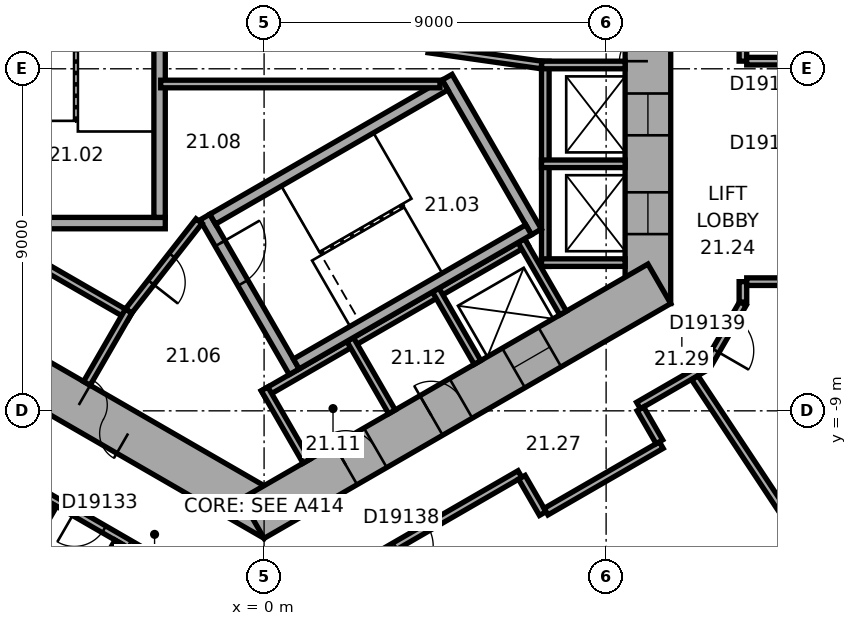
"""IFC4 building model, lengths in metres.
Left out: names, types, materials, properties, quantities, classifications, styles, units other than length and angle.
Written with IfcOpenShell. Run it as: python <this file> out.ifc"""

import sys

from ifc_helpers import new_model, si_unit, direction, frame, frame_2d, origin, place, context, subcontext, project, spatial, rectangle, extrude, element, fill, save


model = new_model("IFC4")
c1 = context("Model", 3, precision=1e-05, world=origin(), true_north=direction((0.0, 1.0)))
c2 = subcontext(c1, "Body", "Model", "MODEL_VIEW")
j1 = project(units=[si_unit("LENGTHUNIT", "METRE"), si_unit("PLANEANGLEUNIT", "RADIAN")], contexts=[c1])
p1 = place(None, origin())
s1 = spatial("IfcSite", under=j1, at=p1, CompositionType="ELEMENT")
p2 = place(p1, origin())
s2 = spatial("IfcBuilding", under=s1, at=p2, CompositionType="ELEMENT")
p3 = place(p2, frame((0.0, 0.0, 93.5)))
s3 = spatial("IfcBuildingStorey", under=s2, at=p3, CompositionType="ELEMENT", Elevation=93.5)
p4 = place(p3, frame((10.1, -6.177, 0.0), z_axis=(0.0, 0.0, 1.0), x_axis=(0.0, 1.0, 0.0)))
e1 = element("IfcWall", 1, at=p4, inside=s3, PredefinedType="SHEAR", context=c2, shape_type="SweptSolid", body=[
    extrude(rectangle(XDim=12.355, YDim=1.2, at=frame_2d((6.177, 0.0))), origin(), (0.0, 0.0, 1.0), 3.3),
])
p5 = place(p4, frame((6.378, 0.0, 0.0)))
e2 = element("IfcOpeningElement", 2, at=p5, cuts=e1, PredefinedType="OPENING", context=c2, shape_type="SweptSolid", body=[
    extrude(rectangle(XDim=1.5, YDim=2.1, at=frame_2d((0.75, 1.05))), frame((0.0, 0.61, 0.0), z_axis=(0.0, -1.0, 0.0), x_axis=(1.0, 0.0, 0.0)), (0.0, 0.0, 1.0), 1.22),
])
p6 = place(p4, frame((1.828, 0.0, 0.0)))
e3 = element("IfcOpeningElement", 3, at=p6, cuts=e1, PredefinedType="OPENING", context=c2, shape_type="SweptSolid", body=[
    extrude(rectangle(XDim=1.1, YDim=2.1, at=frame_2d((0.55, 1.05))), frame((0.0, 0.61, 0.0), z_axis=(0.0, -1.0, 0.0), x_axis=(1.0, 0.0, 0.0)), (0.0, 0.0, 1.0), 1.22),
])
p7 = place(p4, frame((4.427, 0.0, 0.0)))
e4 = element("IfcOpeningElement", 4, at=p7, cuts=e1, PredefinedType="OPENING", context=c2, shape_type="SweptSolid", body=[
    extrude(rectangle(XDim=1.1, YDim=2.1, at=frame_2d((0.55, 1.05))), frame((0.0, 0.61, 0.0), z_axis=(0.0, -1.0, 0.0), x_axis=(1.0, 0.0, 0.0)), (0.0, 0.0, 1.0), 1.22),
])
p8 = place(p3, frame((-10.4, -5.658, 0.0), z_axis=(0.0, 0.0, 1.0), x_axis=(0.866021384402, -0.500006961711, 0.0)))
e5 = element("IfcWall", 5, at=p8, inside=s3, PredefinedType="SHEAR", context=c2, shape_type="SweptSolid", body=[
    extrude(rectangle(XDim=12.355, YDim=1.2, at=frame_2d((6.178, 0.0))), origin(), (0.0, 0.0, 1.0), 3.3),
])
p9 = place(p8, frame((6.378, 0.0, 0.0)))
e6 = element("IfcOpeningElement", 6, at=p9, cuts=e5, PredefinedType="OPENING", context=c2, shape_type="SweptSolid", body=[
    extrude(rectangle(XDim=1.5, YDim=2.1, at=frame_2d((0.75, 1.05))), frame((0.0, 0.61, 0.0), z_axis=(0.0, -1.0, 0.0), x_axis=(1.0, 0.0, 0.0)), (0.0, 0.0, 1.0), 1.22),
])
p10 = place(p8, frame((3.228, 0.0, 0.0)))
e7 = element("IfcOpeningElement", 7, at=p10, cuts=e5, PredefinedType="OPENING", context=c2, shape_type="SweptSolid", body=[
    extrude(rectangle(XDim=0.9, YDim=2.1, at=frame_2d((0.45, 1.05))), frame((0.0, 0.61, 0.0), z_axis=(0.0, -1.0, 0.0), x_axis=(1.0, 0.0, 0.0)), (0.0, 0.0, 1.0), 1.22),
])
p11 = place(p3, frame((-0.3, -11.836, 0.0), z_axis=(0.0, 0.0, 1.0), x_axis=(0.866021384402, 0.500006961711, 0.0)))
e8 = element("IfcWall", 8, at=p11, inside=s3, PredefinedType="SHEAR", context=c2, shape_type="SweptSolid", body=[
    extrude(rectangle(XDim=12.355, YDim=1.2, at=frame_2d((6.178, 0.0))), origin(), (0.0, 0.0, 1.0), 3.3),
])
p12 = place(p11, frame((2.828, 0.0, 0.0)))
e9 = element("IfcOpeningElement", 9, at=p12, cuts=e8, PredefinedType="OPENING", context=c2, shape_type="SweptSolid", body=[
    extrude(rectangle(XDim=0.9, YDim=2.1, at=frame_2d((0.45, 1.05))), frame((0.0, 0.61, 0.0), z_axis=(0.0, -1.0, 0.0), x_axis=(1.0, 0.0, 0.0)), (0.0, 0.0, 1.0), 1.22),
])
p13 = place(p11, frame((5.428, 0.0, 0.0)))
e10 = element("IfcOpeningElement", 10, at=p13, cuts=e8, PredefinedType="OPENING", context=c2, shape_type="SweptSolid", body=[
    extrude(rectangle(XDim=0.9, YDim=2.1, at=frame_2d((0.45, 1.05))), frame((0.0, 0.61, 0.0), z_axis=(0.0, -1.0, 0.0), x_axis=(1.0, 0.0, 0.0)), (0.0, 0.0, 1.0), 1.22),
])
p14 = place(p11, frame((7.928, 0.0, 0.0)))
e11 = element("IfcOpeningElement", 11, at=p14, cuts=e8, PredefinedType="OPENING", context=c2, shape_type="SweptSolid", body=[
    extrude(rectangle(XDim=1.1, YDim=2.1, at=frame_2d((0.55, 1.05))), frame((0.0, 0.61, 0.0), z_axis=(0.0, -1.0, 0.0), x_axis=(1.0, 0.0, 0.0)), (0.0, 0.0, 1.0), 1.22),
])
p15 = place(p3, frame((7.4, -5.2, 0.0), z_axis=(0.0, 0.0, 1.0), x_axis=(0.0, 1.0, 0.0)))
e12 = element("IfcWall", 12, at=p15, inside=s3, PredefinedType="PARTITIONING", context=c2, shape_type="SweptSolid", body=[
    extrude(rectangle(XDim=5.4, YDim=0.2, at=frame_2d((2.7, 0.0))), origin(), (0.0, 0.0, 1.0), 3.05),
])
for number, where, z_axis, x_axis in (
    (13, (7.3, -5.1, 0.0), (0.0, 0.0, 1.0), (1.0, 0.0, 0.0)),
    (14, (7.3, -2.5, 0.0), (0.0, 0.0, 1.0), (1.0, 0.0, 0.0)),
    (15, (7.3, 0.1, 0.0), (0.0, 0.0, 1.0), (1.0, 0.0, 0.0)),
):
    element("IfcWall", number, at=place(p3, frame(where, z_axis=z_axis, x_axis=x_axis)), inside=s3, PredefinedType="PARTITIONING", context=c2, shape_type="SweptSolid", body=[
        extrude(rectangle(XDim=2.2, YDim=0.2, at=frame_2d((1.1, 0.0))), origin(), (0.0, 0.0, 1.0), 3.05),
    ])
p16 = place(p3, frame((-8.203, -3.809, 0.0), z_axis=(0.0, 0.0, 1.0), x_axis=(0.866028230842, -0.499995103361, 0.0)))
e16 = element("IfcWall", 16, at=p16, inside=s3, PredefinedType="PARTITIONING", context=c2, shape_type="SweptSolid", body=[
    extrude(rectangle(XDim=5.4, YDim=0.2, at=frame_2d((2.7, 0.0))), origin(), (0.0, 0.0, 1.0), 3.05),
])
p17 = place(p3, frame((-3.563, -6.372, 0.0), z_axis=(0.0, 0.0, 1.0), x_axis=(-0.499994660107, -0.866028486751, 0.0)))
e17 = element("IfcWall", 17, at=p17, inside=s3, PredefinedType="PARTITIONING", context=c2, shape_type="SweptSolid", body=[
    extrude(rectangle(XDim=2.2, YDim=0.2, at=frame_2d((1.1, 0.0))), origin(), (0.0, 0.0, 1.0), 3.05),
])
p18 = place(p3, frame((-0.024, -8.559, 0.0), z_axis=(0.0, 0.0, 1.0), x_axis=(0.866026010844, 0.49999894854, 0.0)))
e18 = element("IfcWall", 18, at=p18, inside=s3, PredefinedType="PARTITIONING", context=c2, shape_type="SweptSolid", body=[
    extrude(rectangle(XDim=8.0, YDim=0.2, at=frame_2d((4.0, 0.0))), origin(), (0.0, 0.0, 1.0), 3.05),
])
for number, where, z_axis, x_axis in (
    (19, (0.013, -8.422, 0.0), (0.0, 0.0, 1.0), (0.5, -0.866, 0.0)),
    (20, (2.264, -7.122, 0.0), (0.0, 0.0, 1.0), (0.5, -0.866, 0.0)),
    (21, (4.516, -5.822, 0.0), (0.0, 0.0, 1.0), (0.5, -0.866, 0.0)),
    (22, (6.768, -4.522, 0.0), (0.0, 0.0, 1.0), (0.5, -0.866, 0.0)),
):
    element("IfcWall", number, at=place(p3, frame(where, z_axis=z_axis, x_axis=x_axis)), inside=s3, PredefinedType="PARTITIONING", context=c2, shape_type="SweptSolid", body=[
        extrude(rectangle(XDim=2.2, YDim=0.2, at=frame_2d((1.1, 0.0))), origin(), (0.0, 0.0, 1.0), 3.05),
    ])
p19 = place(p3, frame((-2.6, -4.06, 0.0), z_axis=(0.0, 0.0, 1.0), x_axis=(-1.0, 0.0, 0.0)))
e23 = element("IfcWall", 23, at=p19, inside=s3, PredefinedType="SHEAR", context=c2, shape_type="SweptSolid", body=[
    extrude(rectangle(XDim=4.7, YDim=0.3, at=frame_2d((2.35, 0.0))), origin(), (0.0, 0.0, 1.0), 3.05),
])
p20 = place(p3, frame((-2.75, 3.15, 0.0), z_axis=(0.0, 0.0, 1.0), x_axis=(0.0, -1.0, 0.0)))
e24 = element("IfcWall", 24, at=p20, inside=s3, PredefinedType="SHEAR", context=c2, shape_type="SweptSolid", body=[
    extrude(rectangle(XDim=7.06, YDim=0.3, at=frame_2d((3.53, 0.0))), origin(), (0.0, 0.0, 1.0), 3.05),
])
p21 = place(p3, frame((-1.558, -3.902, 0.0), z_axis=(0.0, 0.0, 1.0), x_axis=(0.499977259774, -0.866038532462, 0.0)))
e25 = element("IfcWall", 25, at=p21, inside=s3, PredefinedType="SHEAR", context=c2, shape_type="SweptSolid", body=[
    extrude(rectangle(XDim=4.7, YDim=0.3, at=frame_2d((2.35, 0.0))), origin(), (0.0, 0.0, 1.0), 3.05),
])
p22 = place(p21, frame((0.8, 0.0, 0.0)))
e26 = element("IfcOpeningElement", 26, at=p22, cuts=e25, PredefinedType="OPENING", context=c2, shape_type="SweptSolid", body=[
    extrude(rectangle(XDim=1.2, YDim=2.1, at=frame_2d((0.6, 1.05))), frame((0.0, 0.16, 0.0), z_axis=(0.0, -1.0, 0.0), x_axis=(1.0, 0.0, 0.0)), (0.0, 0.0, 1.0), 0.32),
])
p23 = place(p3, frame((4.816, -0.222, 0.0), z_axis=(0.0, 0.0, 1.0), x_axis=(0.499977259774, -0.866038532462, 0.0)))
e27 = element("IfcWall", 27, at=p23, inside=s3, PredefinedType="SHEAR", context=c2, shape_type="SweptSolid", body=[
    extrude(rectangle(XDim=4.7, YDim=0.3, at=frame_2d((2.35, 0.0))), origin(), (0.0, 0.0, 1.0), 3.05),
])
for number, where, z_axis, x_axis in (
    (28, (-1.353, -3.957, 0.0), (0.0, 0.0, 1.0), (0.866, 0.5, 0.0)),
    (29, (0.847, -7.767, 0.0), (0.0, 0.0, 1.0), (0.866, 0.5, 0.0)),
):
    element("IfcWall", number, at=place(p3, frame(where, z_axis=z_axis, x_axis=x_axis)), inside=s3, PredefinedType="SHEAR", context=c2, shape_type="SweptSolid", body=[
        extrude(rectangle(XDim=7.06, YDim=0.3, at=frame_2d((3.53, 0.0))), origin(), (0.0, 0.0, 1.0), 3.05),
    ])
p24 = place(p3, frame((4.327, 0.521, 0.0), z_axis=(0.0, 0.0, 1.0), x_axis=(0.990124376366, -0.14019172346, 0.0)))
e30 = element("IfcWall", 30, at=p24, inside=s3, PredefinedType="PARTITIONING", context=c2, shape_type="SweptSolid", body=[
    extrude(rectangle(XDim=3.002, YDim=0.2, at=frame_2d((1.501, 0.0))), origin(), (0.0, 0.0, 1.0), 3.05),
])
p25 = place(p3, frame((-1.712, -4.008, 0.0), z_axis=(0.0, 0.0, 1.0), x_axis=(-0.616549420702, -0.787316208287, 0.0)))
e31 = element("IfcWall", 31, at=p25, inside=s3, PredefinedType="PARTITIONING", context=c2, shape_type="SweptSolid", body=[
    extrude(rectangle(XDim=3.002, YDim=0.2, at=frame_2d((1.501, 0.0))), origin(), (0.0, 0.0, 1.0), 3.05),
])
p26 = place(p25, frame((1.15, 0.0, 0.0)))
e32 = element("IfcOpeningElement", 32, at=p26, cuts=e31, PredefinedType="OPENING", context=c2, shape_type="SweptSolid", body=[
    extrude(rectangle(XDim=0.9, YDim=2.1, at=frame_2d((0.45, 1.05))), frame((0.0, 0.11, 0.0), z_axis=(0.0, -1.0, 0.0), x_axis=(1.0, 0.0, 0.0)), (0.0, 0.0, 1.0), 0.22),
])
p27 = place(p3, frame((-2.72, -0.4, 0.0), z_axis=(0.0, 0.0, 1.0), x_axis=(1.0, 0.0, 0.0)))
e33 = element("IfcWall", 33, at=p27, inside=s3, PredefinedType="PARTITIONING", context=c2, shape_type="SweptSolid", body=[
    extrude(rectangle(XDim=7.347, YDim=0.2, at=frame_2d((3.674, 0.0))), origin(), (0.0, 0.0, 1.0), 3.05),
])
p28 = place(p3, frame((-11.615, -7.843, 0.0), z_axis=(0.0, 0.0, 1.0), x_axis=(0.866026466995, -0.499998158461, 0.0)))
e34 = element("IfcWall", 34, at=p28, inside=s3, PredefinedType="PARTITIONING", context=c2, shape_type="SweptSolid", body=[
    extrude(rectangle(XDim=12.315, YDim=0.2, at=frame_2d((6.158, 0.0))), origin(), (0.0, 0.0, 1.0), 3.05),
])
p29 = place(p28, frame((1.665, 0.0, 0.0)))
e35 = element("IfcOpeningElement", 35, at=p29, cuts=e34, PredefinedType="OPENING", context=c2, shape_type="SweptSolid", body=[
    extrude(rectangle(XDim=0.9, YDim=2.1, at=frame_2d((0.45, 1.05))), frame((0.0, 0.11, 0.0), z_axis=(0.0, -1.0, 0.0), x_axis=(1.0, 0.0, 0.0)), (0.0, 0.0, 1.0), 0.22),
])
p30 = place(p28, frame((7.65, 0.0, 0.0)))
e36 = element("IfcOpeningElement", 36, at=p30, cuts=e34, PredefinedType="OPENING", context=c2, shape_type="SweptSolid", body=[
    extrude(rectangle(XDim=0.9, YDim=2.1, at=frame_2d((0.45, 1.05))), frame((0.0, 0.11, 0.0), z_axis=(0.0, -1.0, 0.0), x_axis=(1.0, 0.0, 0.0)), (0.0, 0.0, 1.0), 0.22),
])
p31 = place(p28, frame((9.317, 0.0, 0.0)))
e37 = element("IfcOpeningElement", 37, at=p31, cuts=e34, PredefinedType="OPENING", context=c2, shape_type="SweptSolid", body=[
    extrude(rectangle(XDim=0.9, YDim=2.1, at=frame_2d((0.45, 1.05))), frame((0.0, 0.11, 0.0), z_axis=(0.0, -1.0, 0.0), x_axis=(1.0, 0.0, 0.0)), (0.0, 0.0, 1.0), 0.22),
])
p32 = place(p3, frame((-8.46, -20.461, 0.0), z_axis=(0.0, 0.0, 1.0), x_axis=(0.499999662836, 0.866025598446, 0.0)))
e38 = element("IfcWall", 38, at=p32, inside=s3, PredefinedType="PARTITIONING", context=c2, shape_type="SweptSolid", body=[
    extrude(rectangle(XDim=9.25, YDim=0.2, at=frame_2d((4.625, 0.0))), origin(), (0.0, 0.0, 1.0), 3.05),
])
p33 = place(p3, frame((-5.51, -11.483, 0.0), z_axis=(0.0, 0.0, 1.0), x_axis=(-0.500004234368, -0.866022959057, 0.0)))
e39 = element("IfcWall", 39, at=p33, inside=s3, PredefinedType="PARTITIONING", context=c2, shape_type="SweptSolid", body=[
    extrude(rectangle(XDim=2.5, YDim=0.12, at=frame_2d((1.25, 0.0))), origin(), (0.0, 0.0, 1.0), 3.05),
])
p34 = place(p33, frame((0.8, 0.0, 0.0)))
e40 = element("IfcOpeningElement", 40, at=p34, cuts=e39, PredefinedType="OPENING", context=c2, shape_type="SweptSolid", body=[
    extrude(rectangle(XDim=0.9, YDim=2.1, at=frame_2d((0.45, 1.05))), frame((0.0, 0.07, 0.0), z_axis=(0.0, -1.0, 0.0), x_axis=(1.0, 0.0, 0.0)), (0.0, 0.0, 1.0), 0.14),
])
p35 = place(p3, frame((1.033, -13.953, 0.0), z_axis=(0.0, 0.0, 1.0), x_axis=(0.866017531406, 0.500013635111, 0.0)))
e41 = element("IfcWall", 41, at=p35, inside=s3, PredefinedType="PARTITIONING", context=c2, shape_type="SweptSolid", body=[
    extrude(rectangle(XDim=6.58, YDim=0.2, at=frame_2d((3.29, 0.0))), origin(), (0.0, 0.0, 1.0), 3.05),
])
p36 = place(p35, frame((2.79, 0.0, 0.0)))
e42 = element("IfcOpeningElement", 42, at=p36, cuts=e41, PredefinedType="OPENING", context=c2, shape_type="SweptSolid", body=[
    extrude(rectangle(XDim=1.0, YDim=2.1, at=frame_2d((0.5, 1.05))), frame((0.0, 0.11, 0.0), z_axis=(0.0, -1.0, 0.0), x_axis=(1.0, 0.0, 0.0)), (0.0, 0.0, 1.0), 0.22),
])
p37 = place(p3, frame((6.782, -10.749, 0.0), z_axis=(0.0, 0.0, 1.0), x_axis=(0.500074377092, -0.865982457891, 0.0)))
e43 = element("IfcWall", 43, at=p37, inside=s3, PredefinedType="PARTITIONING", context=c2, shape_type="SweptSolid", body=[
    extrude(rectangle(XDim=1.101, YDim=0.2, at=frame_2d((0.55, 0.0))), origin(), (0.0, 0.0, 1.0), 3.05),
])
p38 = place(p3, frame((7.419, -11.653, 0.0), z_axis=(0.0, 0.0, 1.0), x_axis=(0.866038154057, 0.49997791523, 0.0)))
e44 = element("IfcWall", 44, at=p38, inside=s3, PredefinedType="PARTITIONING", context=c2, shape_type="SweptSolid", body=[
    extrude(rectangle(XDim=3.502, YDim=0.2, at=frame_2d((1.751, 0.0))), origin(), (0.0, 0.0, 1.0), 3.05),
])
p39 = place(p3, frame((9.852, -8.861, 0.0), z_axis=(0.0, 0.0, 1.0), x_axis=(0.866013291437, 0.500020978615, 0.0)))
e45 = element("IfcWall", 45, at=p39, inside=s3, PredefinedType="PARTITIONING", context=c2, shape_type="SweptSolid", body=[
    extrude(rectangle(XDim=2.077, YDim=0.2, at=frame_2d((1.038, 0.0))), origin(), (0.0, 0.0, 1.0), 3.05),
])
p40 = place(p3, frame((10.402, -9.815, 0.0), z_axis=(0.0, 0.0, 1.0), x_axis=(-0.499968756647, 0.866043441391, 0.0)))
e46 = element("IfcWall", 46, at=p40, inside=s3, PredefinedType="PARTITIONING", context=c2, shape_type="SweptSolid", body=[
    extrude(rectangle(XDim=1.001, YDim=0.2, at=frame_2d((0.5, 0.0))), origin(), (0.0, 0.0, 1.0), 3.05),
])
p41 = place(p3, frame((11.67, -7.788, 0.0), z_axis=(0.0, 0.0, 1.0), x_axis=(0.500063286585, 0.865988862174, 0.0)))
e47 = element("IfcWall", 47, at=p41, inside=s3, PredefinedType="PARTITIONING", context=c2, shape_type="SweptSolid", body=[
    extrude(rectangle(XDim=1.86, YDim=0.2, at=frame_2d((0.93, 0.0))), origin(), (0.0, 0.0, 1.0), 3.05),
])
p42 = place(p41, frame((0.43, 0.0, 0.0)))
e48 = element("IfcOpeningElement", 48, at=p42, cuts=e47, PredefinedType="OPENING", context=c2, shape_type="SweptSolid", body=[
    extrude(rectangle(XDim=1.0, YDim=2.1, at=frame_2d((0.5, 1.05))), frame((0.0, 0.11, 0.0), z_axis=(0.0, -1.0, 0.0), x_axis=(1.0, 0.0, 0.0)), (0.0, 0.0, 1.0), 0.22),
])
p43 = place(p3, frame((12.6, -6.138, 0.0), z_axis=(0.0, 0.0, 1.0), x_axis=(0.0, 1.0, 0.0)))
e49 = element("IfcWall", 49, at=p43, inside=s3, PredefinedType="PARTITIONING", context=c2, shape_type="SweptSolid", body=[
    extrude(rectangle(XDim=0.537, YDim=0.2, at=frame_2d((0.268, 0.0))), origin(), (0.0, 0.0, 1.0), 3.05),
])
p44 = place(p3, frame((12.6, 0.201, 0.0), z_axis=(0.0, 0.0, 1.0), x_axis=(0.0, 1.0, 0.0)))
e50 = element("IfcWall", 50, at=p44, inside=s3, PredefinedType="PARTITIONING", context=c2, shape_type="SweptSolid", body=[
    extrude(rectangle(XDim=2.604, YDim=0.2, at=frame_2d((1.302, 0.0))), origin(), (0.0, 0.0, 1.0), 3.05),
])
p45 = place(p3, frame((12.7, -5.601, 0.0), z_axis=(0.0, 0.0, 1.0), x_axis=(1.0, 0.0, 0.0)))
e51 = element("IfcWall", 51, at=p45, inside=s3, PredefinedType="PARTITIONING", context=c2, shape_type="SweptSolid", body=[
    extrude(rectangle(XDim=1.101, YDim=0.2, at=frame_2d((0.551, 0.0))), origin(), (0.0, 0.0, 1.0), 3.05),
])
p46 = place(p3, frame((13.701, 0.201, 0.0), z_axis=(0.0, 0.0, 1.0), x_axis=(-1.0, 0.0, 0.0)))
e52 = element("IfcWall", 52, at=p46, inside=s3, PredefinedType="PARTITIONING", context=c2, shape_type="SweptSolid", body=[
    extrude(rectangle(XDim=1.001, YDim=0.2, at=frame_2d((0.5, 0.0))), origin(), (0.0, 0.0, 1.0), 3.05),
])
p47 = place(p3, frame((16.255, -15.564, 0.0), z_axis=(0.0, 0.0, 1.0), x_axis=(-0.55192208744, 0.833895682562, 0.0)))
e53 = element("IfcWall", 53, at=p47, inside=s3, PredefinedType="PARTITIONING", context=c2, shape_type="SweptSolid", body=[
    extrude(rectangle(XDim=8.913, YDim=0.2, at=frame_2d((4.457, 0.0))), origin(), (0.0, 0.0, 1.0), 2.6),
])
p48 = place(p5, origin())
e54 = element("IfcDoor", 54, at=p48, inside=s3, OperationType="DOUBLE_DOOR_SINGLE_SWING", PredefinedType="DOOR", context=c2, shape_type="SweptSolid", body=[
    extrude(rectangle(XDim=1.5, YDim=2.1, at=frame_2d((0.75, 1.05))), frame((0.0, 0.025, 0.0), z_axis=(0.0, -1.0, 0.0), x_axis=(1.0, 0.0, 0.0)), (0.0, 0.0, 1.0), 0.05),
])
fill(e2, e54)
p49 = place(p9, origin())
e55 = element("IfcDoor", 55, at=p49, inside=s3, OperationType="DOUBLE_DOOR_SINGLE_SWING", PredefinedType="DOOR", context=c2, shape_type="SweptSolid", body=[
    extrude(rectangle(XDim=1.5, YDim=2.1, at=frame_2d((0.75, 1.05))), frame((0.0, 0.025, 0.0), z_axis=(0.0, -1.0, 0.0), x_axis=(1.0, 0.0, 0.0)), (0.0, 0.0, 1.0), 0.05),
])
fill(e6, e55)
p50 = place(p22, origin())
e56 = element("IfcDoor", 56, at=p50, inside=s3, OperationType="SINGLE_SWING_RIGHT", PredefinedType="DOOR", context=c2, shape_type="SweptSolid", body=[
    extrude(rectangle(XDim=1.2, YDim=2.1, at=frame_2d((0.6, 1.05))), frame((0.0, 0.025, 0.0), z_axis=(0.0, -1.0, 0.0), x_axis=(1.0, 0.0, 0.0)), (0.0, 0.0, 1.0), 0.05),
])
fill(e26, e56)
p51 = place(p26, origin())
e57 = element("IfcDoor", 57, at=p51, inside=s3, OperationType="SINGLE_SWING_LEFT", PredefinedType="DOOR", context=c2, shape_type="SweptSolid", body=[
    extrude(rectangle(XDim=0.9, YDim=2.1, at=frame_2d((0.45, 1.05))), frame((0.0, 0.025, 0.0), z_axis=(0.0, -1.0, 0.0), x_axis=(1.0, 0.0, 0.0)), (0.0, 0.0, 1.0), 0.05),
])
fill(e32, e57)
p52 = place(p12, origin())
e58 = element("IfcDoor", 58, at=p52, inside=s3, OperationType="SINGLE_SWING_LEFT", PredefinedType="DOOR", context=c2, shape_type="SweptSolid", body=[
    extrude(rectangle(XDim=0.9, YDim=2.1, at=frame_2d((0.45, 1.05))), frame((0.0, 0.025, 0.0), z_axis=(0.0, -1.0, 0.0), x_axis=(1.0, 0.0, 0.0)), (0.0, 0.0, 1.0), 0.05),
])
fill(e9, e58)
p53 = place(p13, origin())
e59 = element("IfcDoor", 59, at=p53, inside=s3, OperationType="SINGLE_SWING_LEFT", PredefinedType="DOOR", context=c2, shape_type="SweptSolid", body=[
    extrude(rectangle(XDim=0.9, YDim=2.1, at=frame_2d((0.45, 1.05))), frame((0.0, 0.025, 0.0), z_axis=(0.0, -1.0, 0.0), x_axis=(1.0, 0.0, 0.0)), (0.0, 0.0, 1.0), 0.05),
])
fill(e10, e59)
p54 = place(p6, origin())
e60 = element("IfcDoor", 60, at=p54, inside=s3, OperationType="DOUBLE_DOOR_SLIDING", PredefinedType="DOOR", context=c2, shape_type="SweptSolid", body=[
    extrude(rectangle(XDim=1.1, YDim=2.1, at=frame_2d((0.55, 1.05))), frame((0.0, 0.025, 0.0), z_axis=(0.0, -1.0, 0.0), x_axis=(1.0, 0.0, 0.0)), (0.0, 0.0, 1.0), 0.05),
])
fill(e3, e60)
p55 = place(p7, origin())
e61 = element("IfcDoor", 61, at=p55, inside=s3, OperationType="DOUBLE_DOOR_SLIDING", PredefinedType="DOOR", context=c2, shape_type="SweptSolid", body=[
    extrude(rectangle(XDim=1.1, YDim=2.1, at=frame_2d((0.55, 1.05))), frame((0.0, 0.025, 0.0), z_axis=(0.0, -1.0, 0.0), x_axis=(1.0, 0.0, 0.0)), (0.0, 0.0, 1.0), 0.05),
])
fill(e4, e61)
p56 = place(p14, origin())
e62 = element("IfcDoor", 62, at=p56, inside=s3, OperationType="DOUBLE_DOOR_SLIDING", PredefinedType="DOOR", context=c2, shape_type="SweptSolid", body=[
    extrude(rectangle(XDim=1.1, YDim=2.1, at=frame_2d((0.55, 1.05))), frame((0.0, 0.025, 0.0), z_axis=(0.0, -1.0, 0.0), x_axis=(1.0, 0.0, 0.0)), (0.0, 0.0, 1.0), 0.05),
])
fill(e11, e62)
p57 = place(p30, origin())
e63 = element("IfcDoor", 63, at=p57, inside=s3, OperationType="SINGLE_SWING_LEFT", PredefinedType="DOOR", context=c2, shape_type="SweptSolid", body=[
    extrude(rectangle(XDim=0.9, YDim=2.1, at=frame_2d((0.45, 1.05))), frame((0.0, 0.025, 0.0), z_axis=(0.0, -1.0, 0.0), x_axis=(1.0, 0.0, 0.0)), (0.0, 0.0, 1.0), 0.05),
])
fill(e36, e63)
p58 = place(p31, origin())
e64 = element("IfcDoor", 64, at=p58, inside=s3, OperationType="SINGLE_SWING_LEFT", PredefinedType="DOOR", context=c2, shape_type="SweptSolid", body=[
    extrude(rectangle(XDim=0.9, YDim=2.1, at=frame_2d((0.45, 1.05))), frame((0.0, 0.025, 0.0), z_axis=(0.0, -1.0, 0.0), x_axis=(1.0, 0.0, 0.0)), (0.0, 0.0, 1.0), 0.05),
])
fill(e37, e64)
p59 = place(p36, origin())
e65 = element("IfcDoor", 65, at=p59, inside=s3, OperationType="SINGLE_SWING_LEFT", PredefinedType="DOOR", context=c2, shape_type="SweptSolid", body=[
    extrude(rectangle(XDim=1.0, YDim=2.1, at=frame_2d((0.5, 1.05))), frame((0.0, 0.025, 0.0), z_axis=(0.0, -1.0, 0.0), x_axis=(1.0, 0.0, 0.0)), (0.0, 0.0, 1.0), 0.05),
])
fill(e42, e65)
p60 = place(p42, origin())
e66 = element("IfcDoor", 66, at=p60, inside=s3, OperationType="SINGLE_SWING_LEFT", PredefinedType="DOOR", context=c2, shape_type="SweptSolid", body=[
    extrude(rectangle(XDim=1.0, YDim=2.1, at=frame_2d((0.5, 1.05))), frame((0.0, 0.025, 0.0), z_axis=(0.0, -1.0, 0.0), x_axis=(1.0, 0.0, 0.0)), (0.0, 0.0, 1.0), 0.05),
])
fill(e48, e66)
save(model, sys.argv[1])
